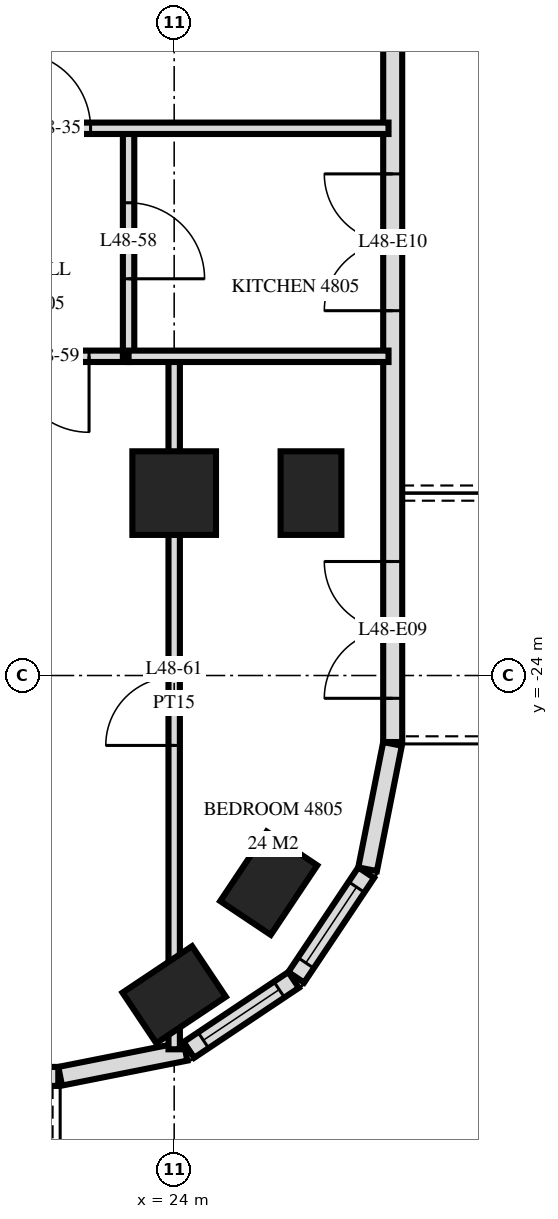
"""IFC4 building model, lengths in metres.
Left out: names, types, materials, properties, quantities, classifications, styles, units other than length and angle.
Written with IfcOpenShell. Run it as: python <this file> out.ifc"""

import sys

from ifc_helpers import new_model, si_unit, direction, frame, frame_2d, origin, origin_2d, place, context, subcontext, project, spatial, rectangle, extrude, element, fill, save


model = new_model("IFC4")
c1 = context("Model", 3, precision=1e-05, world=origin(), true_north=direction((0.0, 1.0)))
c2 = subcontext(c1, "Body", "Model", "MODEL_VIEW")
j1 = project(units=[si_unit("LENGTHUNIT", "METRE"), si_unit("PLANEANGLEUNIT", "RADIAN")], contexts=[c1])
p1 = place(None, origin())
s1 = spatial("IfcSite", under=j1, at=p1, CompositionType="ELEMENT")
p2 = place(p1, origin())
s2 = spatial("IfcBuilding", under=s1, at=p2, CompositionType="ELEMENT")
p3 = place(p2, frame((0.0, 0.0, 187.1)))
s3 = spatial("IfcBuildingStorey", under=s2, at=p3, CompositionType="ELEMENT", Elevation=187.1)
p4 = place(p3, frame((24.0, -28.2, 0.0), z_axis=(0.0, 0.0, 1.0), x_axis=(0.831459915646, 0.555584744817, 0.0)))
e1 = element("IfcColumn", 1, at=p4, inside=s3, PredefinedType="COLUMN", context=c2, shape_type="SweptSolid", body=[
    extrude(rectangle(XDim=1.1, YDim=0.8, at=origin_2d()), origin(), (0.0, 0.0, 1.0), 3.5),
])
p5 = place(p3, frame((24.0, -21.6, 0.0), z_axis=(0.0, 0.0, 1.0), x_axis=(1.0, 0.0, 0.0)))
e2 = element("IfcColumn", 2, at=p5, inside=s3, PredefinedType="COLUMN", context=c2, shape_type="SweptSolid", body=[
    extrude(rectangle(XDim=1.1, YDim=1.1, at=origin_2d()), origin(), (0.0, 0.0, 1.0), 3.5),
])
for number, where, z_axis, x_axis in (
    (3, (25.244, -26.733, 0.0), (0.0, 0.0, 1.0), (0.556, 0.831, 0.0)),
    (4, (25.8, -21.6, 0.0), (0.0, 0.0, 1.0), (0.0, 1.0, 0.0)),
):
    element("IfcColumn", number, at=place(p3, frame(where, z_axis=z_axis, x_axis=x_axis)), inside=s3, PredefinedType="COLUMN", context=c2, shape_type="SweptSolid", body=[
        extrude(rectangle(XDim=1.1, YDim=0.8, at=origin_2d()), origin(), (0.0, 0.0, 1.0), 3.5),
    ])
p6 = place(p3, frame((-22.475, -29.275, 0.0), z_axis=(0.0, 0.0, 1.0), x_axis=(1.0, 0.0, 0.0)))
e5 = element("IfcWall", 5, at=p6, inside=s3, PredefinedType="SOLIDWALL", context=c2, shape_type="SweptSolid", body=[
    extrude(rectangle(XDim=44.951, YDim=0.25, at=frame_2d((22.475, 0.0))), origin(), (0.0, 0.0, 1.0), 3.22),
])
p7 = place(p6, frame((0.575, 0.0, 0.0)))
e6 = element("IfcOpeningElement", 6, at=p7, cuts=e5, PredefinedType="OPENING", context=c2, shape_type="SweptSolid", body=[
    extrude(rectangle(XDim=1.8, YDim=2.4, at=frame_2d((0.9, 1.2))), frame((0.0, 0.135, 0.0), z_axis=(0.0, -1.0, 0.0), x_axis=(1.0, 0.0, 0.0)), (0.0, 0.0, 1.0), 0.27),
])
p8 = place(p6, frame((4.775, 0.0, 0.9)))
e7 = element("IfcOpeningElement", 7, at=p8, cuts=e5, PredefinedType="OPENING", context=c2, shape_type="SweptSolid", body=[
    extrude(rectangle(XDim=2.4, YDim=1.5, at=frame_2d((1.2, 0.75))), frame((0.0, 0.135, 0.0), z_axis=(0.0, -1.0, 0.0), x_axis=(1.0, 0.0, 0.0)), (0.0, 0.0, 1.0), 0.27),
])
p9 = place(p6, frame((8.075, 0.0, 0.0)))
e8 = element("IfcOpeningElement", 8, at=p9, cuts=e5, PredefinedType="OPENING", context=c2, shape_type="SweptSolid", body=[
    extrude(rectangle(XDim=1.8, YDim=2.4, at=frame_2d((0.9, 1.2))), frame((0.0, 0.135, 0.0), z_axis=(0.0, -1.0, 0.0), x_axis=(1.0, 0.0, 0.0)), (0.0, 0.0, 1.0), 0.27),
])
p10 = place(p6, frame((11.075, 0.0, 0.0)))
e9 = element("IfcOpeningElement", 9, at=p10, cuts=e5, PredefinedType="OPENING", context=c2, shape_type="SweptSolid", body=[
    extrude(rectangle(XDim=1.8, YDim=2.4, at=frame_2d((0.9, 1.2))), frame((0.0, 0.135, 0.0), z_axis=(0.0, -1.0, 0.0), x_axis=(1.0, 0.0, 0.0)), (0.0, 0.0, 1.0), 0.27),
])
p11 = place(p6, frame((13.775, 0.0, 0.9)))
e10 = element("IfcOpeningElement", 10, at=p11, cuts=e5, PredefinedType="OPENING", context=c2, shape_type="SweptSolid", body=[
    extrude(rectangle(XDim=2.4, YDim=1.5, at=frame_2d((1.2, 0.75))), frame((0.0, 0.135, 0.0), z_axis=(0.0, -1.0, 0.0), x_axis=(1.0, 0.0, 0.0)), (0.0, 0.0, 1.0), 0.27),
])
p12 = place(p6, frame((20.075, 0.0, 0.0)))
e11 = element("IfcOpeningElement", 11, at=p12, cuts=e5, PredefinedType="OPENING", context=c2, shape_type="SweptSolid", body=[
    extrude(rectangle(XDim=1.8, YDim=2.4, at=frame_2d((0.9, 1.2))), frame((0.0, 0.135, 0.0), z_axis=(0.0, -1.0, 0.0), x_axis=(1.0, 0.0, 0.0)), (0.0, 0.0, 1.0), 0.27),
])
p13 = place(p6, frame((23.075, 0.0, 0.0)))
e12 = element("IfcOpeningElement", 12, at=p13, cuts=e5, PredefinedType="OPENING", context=c2, shape_type="SweptSolid", body=[
    extrude(rectangle(XDim=1.8, YDim=2.4, at=frame_2d((0.9, 1.2))), frame((0.0, 0.135, 0.0), z_axis=(0.0, -1.0, 0.0), x_axis=(1.0, 0.0, 0.0)), (0.0, 0.0, 1.0), 0.27),
])
p14 = place(p6, frame((29.075, 0.0, 0.0)))
e13 = element("IfcOpeningElement", 13, at=p14, cuts=e5, PredefinedType="OPENING", context=c2, shape_type="SweptSolid", body=[
    extrude(rectangle(XDim=1.8, YDim=2.4, at=frame_2d((0.9, 1.2))), frame((0.0, 0.135, 0.0), z_axis=(0.0, -1.0, 0.0), x_axis=(1.0, 0.0, 0.0)), (0.0, 0.0, 1.0), 0.27),
])
p15 = place(p6, frame((31.775, 0.0, 0.9)))
e14 = element("IfcOpeningElement", 14, at=p15, cuts=e5, PredefinedType="OPENING", context=c2, shape_type="SweptSolid", body=[
    extrude(rectangle(XDim=2.4, YDim=1.5, at=frame_2d((1.2, 0.75))), frame((0.0, 0.135, 0.0), z_axis=(0.0, -1.0, 0.0), x_axis=(1.0, 0.0, 0.0)), (0.0, 0.0, 1.0), 0.27),
])
p16 = place(p6, frame((35.075, 0.0, 0.0)))
e15 = element("IfcOpeningElement", 15, at=p16, cuts=e5, PredefinedType="OPENING", context=c2, shape_type="SweptSolid", body=[
    extrude(rectangle(XDim=1.8, YDim=2.4, at=frame_2d((0.9, 1.2))), frame((0.0, 0.135, 0.0), z_axis=(0.0, -1.0, 0.0), x_axis=(1.0, 0.0, 0.0)), (0.0, 0.0, 1.0), 0.27),
])
p17 = place(p6, frame((37.775, 0.0, 0.9)))
e16 = element("IfcOpeningElement", 16, at=p17, cuts=e5, PredefinedType="OPENING", context=c2, shape_type="SweptSolid", body=[
    extrude(rectangle(XDim=2.4, YDim=1.5, at=frame_2d((1.2, 0.75))), frame((0.0, 0.135, 0.0), z_axis=(0.0, -1.0, 0.0), x_axis=(1.0, 0.0, 0.0)), (0.0, 0.0, 1.0), 0.27),
])
p18 = place(p6, frame((41.075, 0.0, 0.0)))
e17 = element("IfcOpeningElement", 17, at=p18, cuts=e5, PredefinedType="OPENING", context=c2, shape_type="SweptSolid", body=[
    extrude(rectangle(XDim=1.8, YDim=2.4, at=frame_2d((0.9, 1.2))), frame((0.0, 0.135, 0.0), z_axis=(0.0, -1.0, 0.0), x_axis=(1.0, 0.0, 0.0)), (0.0, 0.0, 1.0), 0.27),
])
p19 = place(p3, frame((22.5, -29.273, 0.0), z_axis=(0.0, 0.0, 1.0), x_axis=(0.980775640221, 0.19513878023, 0.0)))
e18 = element("IfcWall", 18, at=p19, inside=s3, PredefinedType="SOLIDWALL", context=c2, shape_type="SweptSolid", body=[
    extrude(rectangle(XDim=1.681, YDim=0.25, at=frame_2d((0.841, 0.0))), origin(), (0.0, 0.0, 1.0), 3.22),
])
p20 = place(p3, frame((24.194, -28.926, 0.0), z_axis=(0.0, 0.0, 1.0), x_axis=(0.831482937015, 0.55555029066, 0.0)))
e19 = element("IfcWall", 19, at=p20, inside=s3, PredefinedType="SOLIDWALL", context=c2, shape_type="SweptSolid", body=[
    extrude(rectangle(XDim=1.656, YDim=0.25, at=frame_2d((0.828, 0.0))), origin(), (0.0, 0.0, 1.0), 3.22),
])
p21 = place(p20, frame((0.228, 0.0, 0.9)))
e20 = element("IfcOpeningElement", 20, at=p21, cuts=e19, PredefinedType="OPENING", context=c2, shape_type="SweptSolid", body=[
    extrude(rectangle(XDim=1.2, YDim=1.5, at=frame_2d((0.6, 0.75))), frame((0.0, 0.135, 0.0), z_axis=(0.0, -1.0, 0.0), x_axis=(1.0, 0.0, 0.0)), (0.0, 0.0, 1.0), 0.27),
])
p22 = place(p3, frame((25.606, -27.971, 0.0), z_axis=(0.0, 0.0, 1.0), x_axis=(0.55555029066, 0.831482937015, 0.0)))
e21 = element("IfcWall", 21, at=p22, inside=s3, PredefinedType="SOLIDWALL", context=c2, shape_type="SweptSolid", body=[
    extrude(rectangle(XDim=1.656, YDim=0.25, at=frame_2d((0.828, 0.0))), origin(), (0.0, 0.0, 1.0), 3.22),
])
p23 = place(p22, frame((0.228, 0.0, 0.9)))
e22 = element("IfcOpeningElement", 22, at=p23, cuts=e21, PredefinedType="OPENING", context=c2, shape_type="SweptSolid", body=[
    extrude(rectangle(XDim=1.2, YDim=1.5, at=frame_2d((0.6, 0.75))), frame((0.0, 0.135, 0.0), z_axis=(0.0, -1.0, 0.0), x_axis=(1.0, 0.0, 0.0)), (0.0, 0.0, 1.0), 0.27),
])
p24 = place(p3, frame((26.545, -26.549, 0.0), z_axis=(0.0, 0.0, 1.0), x_axis=(0.195026884138, 0.980797896849, 0.0)))
e23 = element("IfcWall", 23, at=p24, inside=s3, PredefinedType="SOLIDWALL", context=c2, shape_type="SweptSolid", body=[
    extrude(rectangle(XDim=1.681, YDim=0.25, at=frame_2d((0.841, 0.0))), origin(), (0.0, 0.0, 1.0), 3.22),
])
p25 = place(p3, frame((26.875, -24.875, 0.0), z_axis=(0.0, 0.0, 1.0), x_axis=(0.0, 1.0, 0.0)))
e24 = element("IfcWall", 24, at=p25, inside=s3, PredefinedType="SOLIDWALL", context=c2, shape_type="SweptSolid", body=[
    extrude(rectangle(XDim=21.551, YDim=0.25, at=frame_2d((10.775, 0.0))), origin(), (0.0, 0.0, 1.0), 3.22),
])
p26 = place(p25, frame((0.575, 0.0, 0.0)))
e25 = element("IfcOpeningElement", 25, at=p26, cuts=e24, PredefinedType="OPENING", context=c2, shape_type="SweptSolid", body=[
    extrude(rectangle(XDim=1.8, YDim=2.4, at=frame_2d((0.9, 1.2))), frame((0.0, 0.135, 0.0), z_axis=(0.0, -1.0, 0.0), x_axis=(1.0, 0.0, 0.0)), (0.0, 0.0, 1.0), 0.27),
])
p27 = place(p25, frame((5.675, 0.0, 0.0)))
e26 = element("IfcOpeningElement", 26, at=p27, cuts=e24, PredefinedType="OPENING", context=c2, shape_type="SweptSolid", body=[
    extrude(rectangle(XDim=1.8, YDim=2.4, at=frame_2d((0.9, 1.2))), frame((0.0, 0.135, 0.0), z_axis=(0.0, -1.0, 0.0), x_axis=(1.0, 0.0, 0.0)), (0.0, 0.0, 1.0), 0.27),
])
p28 = place(p25, frame((10.175, 0.0, 0.9)))
e27 = element("IfcOpeningElement", 27, at=p28, cuts=e24, PredefinedType="OPENING", context=c2, shape_type="SweptSolid", body=[
    extrude(rectangle(XDim=2.4, YDim=1.5, at=frame_2d((1.2, 0.75))), frame((0.0, 0.135, 0.0), z_axis=(0.0, -1.0, 0.0), x_axis=(1.0, 0.0, 0.0)), (0.0, 0.0, 1.0), 0.27),
])
p29 = place(p25, frame((13.475, 0.0, 0.0)))
e28 = element("IfcOpeningElement", 28, at=p29, cuts=e24, PredefinedType="OPENING", context=c2, shape_type="SweptSolid", body=[
    extrude(rectangle(XDim=1.8, YDim=2.4, at=frame_2d((0.9, 1.2))), frame((0.0, 0.135, 0.0), z_axis=(0.0, -1.0, 0.0), x_axis=(1.0, 0.0, 0.0)), (0.0, 0.0, 1.0), 0.27),
])
p30 = place(p3, frame((24.0, -28.918, 0.0), z_axis=(0.0, 0.0, 1.0), x_axis=(0.0, 1.0, 0.0)))
e29 = element("IfcWall", 29, at=p30, inside=s3, PredefinedType="PARTITIONING", context=c2, shape_type="SweptSolid", body=[
    extrude(rectangle(XDim=9.118, YDim=0.15, at=frame_2d((4.559, 0.0))), origin(), (0.0, 0.0, 1.0), 3.22),
])
p31 = place(p30, frame((3.998, 0.0, 0.0)))
e30 = element("IfcOpeningElement", 30, at=p31, cuts=e29, PredefinedType="OPENING", context=c2, shape_type="SweptSolid", body=[
    extrude(rectangle(XDim=0.9, YDim=2.1, at=frame_2d((0.45, 1.05))), frame((0.0, 0.085, 0.0), z_axis=(0.0, -1.0, 0.0), x_axis=(1.0, 0.0, 0.0)), (0.0, 0.0, 1.0), 0.17),
])
p32 = place(p3, frame((23.4, -19.8, 0.0), z_axis=(0.0, 0.0, 1.0), x_axis=(0.0, 1.0, 0.0)))
e31 = element("IfcWall", 31, at=p32, inside=s3, PredefinedType="PARTITIONING", context=c2, shape_type="SweptSolid", body=[
    extrude(rectangle(XDim=3.0, YDim=0.15, at=frame_2d((1.5, 0.0))), origin(), (0.0, 0.0, 1.0), 3.22),
])
p33 = place(p32, frame((1.02, 0.0, 0.0)))
e32 = element("IfcOpeningElement", 32, at=p33, cuts=e31, PredefinedType="OPENING", context=c2, shape_type="SweptSolid", body=[
    extrude(rectangle(XDim=1.0, YDim=2.1, at=frame_2d((0.5, 1.05))), frame((0.0, 0.085, 0.0), z_axis=(0.0, -1.0, 0.0), x_axis=(1.0, 0.0, 0.0)), (0.0, 0.0, 1.0), 0.17),
])
p34 = place(p3, frame((21.4, -19.8, 0.0), z_axis=(0.0, 0.0, 1.0), x_axis=(1.0, 0.0, 0.0)))
e33 = element("IfcWall", 33, at=p34, inside=s3, PredefinedType="PARTITIONING", context=c2, shape_type="SweptSolid", body=[
    extrude(rectangle(XDim=2.0, YDim=0.15, at=frame_2d((1.0, 0.0))), origin(), (0.0, 0.0, 1.0), 3.22),
])
p35 = place(p34, frame((0.48, 0.0, 0.0)))
e34 = element("IfcOpeningElement", 34, at=p35, cuts=e33, PredefinedType="OPENING", context=c2, shape_type="SweptSolid", body=[
    extrude(rectangle(XDim=1.0, YDim=2.1, at=frame_2d((0.5, 1.05))), frame((0.0, 0.085, 0.0), z_axis=(0.0, -1.0, 0.0), x_axis=(1.0, 0.0, 0.0)), (0.0, 0.0, 1.0), 0.17),
])
p36 = place(p3, frame((23.4, -19.8, 0.0), z_axis=(0.0, 0.0, 1.0), x_axis=(1.0, 0.0, 0.0)))
e35 = element("IfcWall", 35, at=p36, inside=s3, PredefinedType="PARTITIONING", context=c2, shape_type="SweptSolid", body=[
    extrude(rectangle(XDim=3.42, YDim=0.15, at=frame_2d((1.71, 0.0))), origin(), (0.0, 0.0, 1.0), 3.22),
])
p37 = place(p3, frame((-26.82, -16.8, 0.0), z_axis=(0.0, 0.0, 1.0), x_axis=(1.0, 0.0, 0.0)))
e36 = element("IfcWall", 36, at=p37, inside=s3, PredefinedType="PARTITIONING", context=c2, shape_type="SweptSolid", body=[
    extrude(rectangle(XDim=53.64, YDim=0.15, at=frame_2d((26.82, 0.0))), origin(), (0.0, 0.0, 1.0), 3.22),
])
p38 = place(p37, frame((11.97, 0.0, 0.0)))
e37 = element("IfcOpeningElement", 37, at=p38, cuts=e36, PredefinedType="OPENING", context=c2, shape_type="SweptSolid", body=[
    extrude(rectangle(XDim=1.0, YDim=2.1, at=frame_2d((0.5, 1.05))), frame((0.0, 0.085, 0.0), z_axis=(0.0, -1.0, 0.0), x_axis=(1.0, 0.0, 0.0)), (0.0, 0.0, 1.0), 0.17),
])
p39 = place(p37, frame((10.67, 0.0, 0.0)))
e38 = element("IfcOpeningElement", 38, at=p39, cuts=e36, PredefinedType="OPENING", context=c2, shape_type="SweptSolid", body=[
    extrude(rectangle(XDim=1.0, YDim=2.1, at=frame_2d((0.5, 1.05))), frame((0.0, 0.085, 0.0), z_axis=(0.0, -1.0, 0.0), x_axis=(1.0, 0.0, 0.0)), (0.0, 0.0, 1.0), 0.17),
])
p40 = place(p37, frame((3.22, 0.0, 0.0)))
e39 = element("IfcOpeningElement", 39, at=p40, cuts=e36, PredefinedType="OPENING", context=c2, shape_type="SweptSolid", body=[
    extrude(rectangle(XDim=1.0, YDim=2.1, at=frame_2d((0.5, 1.05))), frame((0.0, 0.085, 0.0), z_axis=(0.0, -1.0, 0.0), x_axis=(1.0, 0.0, 0.0)), (0.0, 0.0, 1.0), 0.17),
])
p41 = place(p37, frame((5.02, 0.0, 0.0)))
e40 = element("IfcOpeningElement", 40, at=p41, cuts=e36, PredefinedType="OPENING", context=c2, shape_type="SweptSolid", body=[
    extrude(rectangle(XDim=1.0, YDim=2.1, at=frame_2d((0.5, 1.05))), frame((0.0, 0.085, 0.0), z_axis=(0.0, -1.0, 0.0), x_axis=(1.0, 0.0, 0.0)), (0.0, 0.0, 1.0), 0.17),
])
p42 = place(p37, frame((38.97, 0.0, 0.0)))
e41 = element("IfcOpeningElement", 41, at=p42, cuts=e36, PredefinedType="OPENING", context=c2, shape_type="SweptSolid", body=[
    extrude(rectangle(XDim=1.0, YDim=2.1, at=frame_2d((0.5, 1.05))), frame((0.0, 0.085, 0.0), z_axis=(0.0, -1.0, 0.0), x_axis=(1.0, 0.0, 0.0)), (0.0, 0.0, 1.0), 0.17),
])
p43 = place(p37, frame((48.72, 0.0, 0.0)))
e42 = element("IfcOpeningElement", 42, at=p43, cuts=e36, PredefinedType="OPENING", context=c2, shape_type="SweptSolid", body=[
    extrude(rectangle(XDim=1.0, YDim=2.1, at=frame_2d((0.5, 1.05))), frame((0.0, 0.085, 0.0), z_axis=(0.0, -1.0, 0.0), x_axis=(1.0, 0.0, 0.0)), (0.0, 0.0, 1.0), 0.17),
])
p44 = place(p37, frame((46.92, 0.0, 0.0)))
e43 = element("IfcOpeningElement", 43, at=p44, cuts=e36, PredefinedType="OPENING", context=c2, shape_type="SweptSolid", body=[
    extrude(rectangle(XDim=1.0, YDim=2.1, at=frame_2d((0.5, 1.05))), frame((0.0, 0.085, 0.0), z_axis=(0.0, -1.0, 0.0), x_axis=(1.0, 0.0, 0.0)), (0.0, 0.0, 1.0), 0.17),
])
p45 = place(p37, frame((18.32, 0.0, 0.0)))
e44 = element("IfcOpeningElement", 44, at=p45, cuts=e36, PredefinedType="OPENING", context=c2, shape_type="SweptSolid", body=[
    extrude(rectangle(XDim=1.0, YDim=2.1, at=frame_2d((0.5, 1.05))), frame((0.0, 0.085, 0.0), z_axis=(0.0, -1.0, 0.0), x_axis=(1.0, 0.0, 0.0)), (0.0, 0.0, 1.0), 0.17),
])
p46 = place(p37, frame((26.32, 0.0, 0.0)))
e45 = element("IfcOpeningElement", 45, at=p46, cuts=e36, PredefinedType="OPENING", context=c2, shape_type="SweptSolid", body=[
    extrude(rectangle(XDim=1.0, YDim=2.1, at=frame_2d((0.5, 1.05))), frame((0.0, 0.085, 0.0), z_axis=(0.0, -1.0, 0.0), x_axis=(1.0, 0.0, 0.0)), (0.0, 0.0, 1.0), 0.17),
])
p47 = place(p37, frame((34.32, 0.0, 0.0)))
e46 = element("IfcOpeningElement", 46, at=p47, cuts=e36, PredefinedType="OPENING", context=c2, shape_type="SweptSolid", body=[
    extrude(rectangle(XDim=1.0, YDim=2.1, at=frame_2d((0.5, 1.05))), frame((0.0, 0.085, 0.0), z_axis=(0.0, -1.0, 0.0), x_axis=(1.0, 0.0, 0.0)), (0.0, 0.0, 1.0), 0.17),
])
p48 = place(p21, origin())
e47 = element("IfcWindow", 47, at=p48, inside=s3, PartitioningType="SINGLE_PANEL", PredefinedType="WINDOW", context=c2, shape_type="SweptSolid", body=[
    extrude(rectangle(XDim=1.2, YDim=1.5, at=frame_2d((0.6, 0.75))), frame((0.0, 0.03, 0.0), z_axis=(0.0, -1.0, 0.0), x_axis=(1.0, 0.0, 0.0)), (0.0, 0.0, 1.0), 0.06),
])
fill(e20, e47)
p49 = place(p23, origin())
e48 = element("IfcWindow", 48, at=p49, inside=s3, PartitioningType="SINGLE_PANEL", PredefinedType="WINDOW", context=c2, shape_type="SweptSolid", body=[
    extrude(rectangle(XDim=1.2, YDim=1.5, at=frame_2d((0.6, 0.75))), frame((0.0, 0.03, 0.0), z_axis=(0.0, -1.0, 0.0), x_axis=(1.0, 0.0, 0.0)), (0.0, 0.0, 1.0), 0.06),
])
fill(e22, e48)
p50 = place(p26, origin())
e49 = element("IfcDoor", 49, at=p50, inside=s3, OperationType="DOUBLE_DOOR_SINGLE_SWING", PredefinedType="DOOR", context=c2, shape_type="SweptSolid", body=[
    extrude(rectangle(XDim=1.8, YDim=2.4, at=frame_2d((0.9, 1.2))), frame((0.0, 0.025, 0.0), z_axis=(0.0, -1.0, 0.0), x_axis=(1.0, 0.0, 0.0)), (0.0, 0.0, 1.0), 0.05),
])
fill(e25, e49)
p51 = place(p27, origin())
e50 = element("IfcDoor", 50, at=p51, inside=s3, OperationType="DOUBLE_DOOR_SINGLE_SWING", PredefinedType="DOOR", context=c2, shape_type="SweptSolid", body=[
    extrude(rectangle(XDim=1.8, YDim=2.4, at=frame_2d((0.9, 1.2))), frame((0.0, 0.025, 0.0), z_axis=(0.0, -1.0, 0.0), x_axis=(1.0, 0.0, 0.0)), (0.0, 0.0, 1.0), 0.05),
])
fill(e26, e50)
p52 = place(p43, origin())
e51 = element("IfcDoor", 51, at=p52, inside=s3, OperationType="SINGLE_SWING_RIGHT", PredefinedType="DOOR", context=c2, shape_type="SweptSolid", body=[
    extrude(rectangle(XDim=1.0, YDim=2.1, at=frame_2d((0.5, 1.05))), frame((0.0, 0.025, 0.0), z_axis=(0.0, -1.0, 0.0), x_axis=(1.0, 0.0, 0.0)), (0.0, 0.0, 1.0), 0.05),
])
fill(e42, e51)
p53 = place(p33, frame((0.5, 0.0, 0.0), z_axis=(0.0, 0.0, 1.0), x_axis=(-1.0, 0.0, 0.0)))
e52 = element("IfcDoor", 52, at=p53, inside=s3, OperationType="SINGLE_SWING_LEFT", PredefinedType="DOOR", context=c2, shape_type="SweptSolid", body=[
    extrude(rectangle(XDim=1.0, YDim=2.1, at=frame_2d((0.0, 1.05))), frame((0.0, -0.025, 0.0), z_axis=(0.0, 1.0, 0.0), x_axis=(-1.0, 0.0, 0.0)), (0.0, 0.0, 1.0), 0.05),
])
fill(e32, e52)
p54 = place(p35, frame((0.5, 0.0, 0.0), z_axis=(0.0, 0.0, 1.0), x_axis=(-1.0, 0.0, 0.0)))
e53 = element("IfcDoor", 53, at=p54, inside=s3, OperationType="SINGLE_SWING_RIGHT", PredefinedType="DOOR", context=c2, shape_type="SweptSolid", body=[
    extrude(rectangle(XDim=1.0, YDim=2.1, at=frame_2d((0.0, 1.05))), frame((0.0, -0.025, 0.0), z_axis=(0.0, 1.0, 0.0), x_axis=(-1.0, 0.0, 0.0)), (0.0, 0.0, 1.0), 0.05),
])
fill(e34, e53)
p55 = place(p31, origin())
e54 = element("IfcDoor", 54, at=p55, inside=s3, OperationType="SINGLE_SWING_RIGHT", PredefinedType="DOOR", context=c2, shape_type="SweptSolid", body=[
    extrude(rectangle(XDim=0.9, YDim=2.1, at=frame_2d((0.45, 1.05))), frame((0.0, 0.025, 0.0), z_axis=(0.0, -1.0, 0.0), x_axis=(1.0, 0.0, 0.0)), (0.0, 0.0, 1.0), 0.05),
])
fill(e30, e54)
save(model, sys.argv[1])
